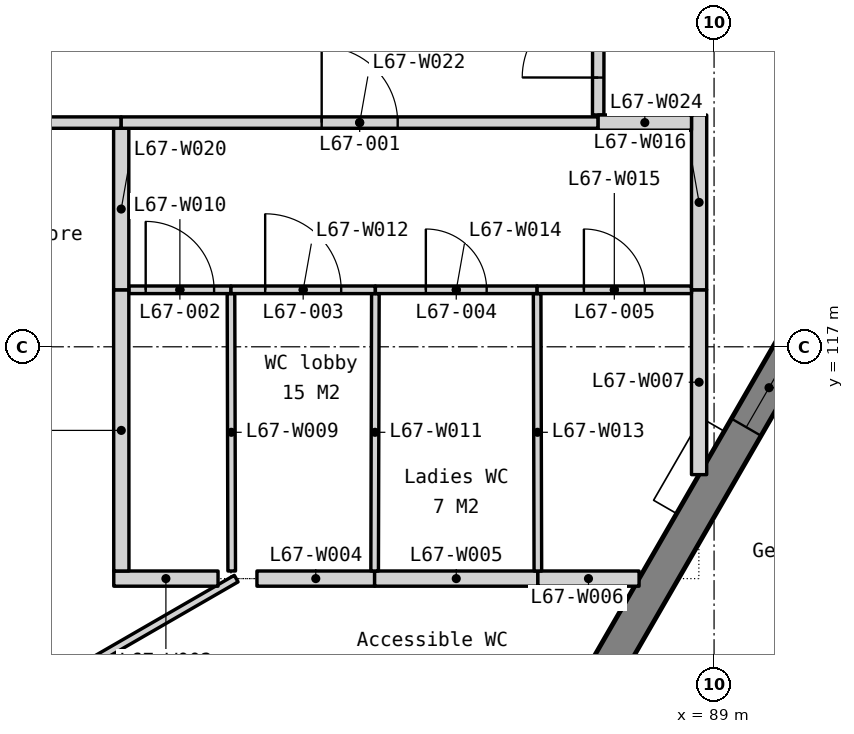
"""IFC4 building model, lengths in metres.
Left out: names, types, materials, properties, quantities, classifications, styles, units other than length and angle.
Written with IfcOpenShell. Run it as: python <this file> out.ifc"""

import sys

from ifc_helpers import new_model, si_unit, direction, frame, frame_2d, origin, place, context, subcontext, project, spatial, polyline, rectangle, outline, extrude, element, fill, save


model = new_model("IFC4")
c1 = context("Model", 3, precision=1e-05, world=origin(), true_north=direction((0.0, 1.0)))
c2 = subcontext(c1, "Body", "Model", "MODEL_VIEW")
j1 = project(units=[si_unit("LENGTHUNIT", "METRE"), si_unit("PLANEANGLEUNIT", "RADIAN")], contexts=[c1])
p1 = place(None, origin())
s1 = spatial("IfcSite", under=j1, at=p1, CompositionType="ELEMENT")
p2 = place(p1, origin())
s2 = spatial("IfcBuilding", under=s1, at=p2, CompositionType="ELEMENT")
p3 = place(p2, frame((0.0, 0.0, 273.8)))
s3 = spatial("IfcBuildingStorey", under=s2, at=p3, CompositionType="ELEMENT", Elevation=273.8)
p4 = place(p3, frame((86.427, 110.752, -0.15), z_axis=(0.0, 0.0, 1.0), x_axis=(0.500000383388, 0.866025182435, 0.0)))
e1 = element("IfcWall", 1, at=p4, inside=s3, PredefinedType="SOLIDWALL", context=c2, shape_type="SweptSolid", body=[
    extrude(outline(polyline([(25.929, 3.9), (25.929, 0.0), (0.0, 0.0), (0.0, 3.9), (25.929, 3.9)])), frame((0.0, 0.225, 0.0), z_axis=(0.0, -1.0, 0.0), x_axis=(1.0, 0.0, 0.0)), (0.0, 0.0, 1.0), 0.45),
])
p5 = place(p4, frame((5.993, 0.0, 0.95)))
e2 = element("IfcOpeningElement", 2, at=p5, cuts=e1, PredefinedType="OPENING", context=c2, shape_type="SweptSolid", body=[
    extrude(rectangle(XDim=1.2, YDim=2.2, at=frame_2d((0.6, 1.1))), frame((0.0, 0.235, 0.0), z_axis=(0.0, -1.0, 0.0), x_axis=(1.0, 0.0, 0.0)), (0.0, 0.0, 1.0), 0.47),
])
p6 = place(p4, frame((7.693, 0.0, 0.95)))
e3 = element("IfcOpeningElement", 3, at=p6, cuts=e1, PredefinedType="OPENING", context=c2, shape_type="SweptSolid", body=[
    extrude(rectangle(XDim=1.2, YDim=2.2, at=frame_2d((0.6, 1.1))), frame((0.0, 0.235, 0.0), z_axis=(0.0, -1.0, 0.0), x_axis=(1.0, 0.0, 0.0)), (0.0, 0.0, 1.0), 0.47),
])
p7 = place(p4, frame((15.236, 0.0, 0.95)))
e4 = element("IfcOpeningElement", 4, at=p7, cuts=e1, PredefinedType="OPENING", context=c2, shape_type="SweptSolid", body=[
    extrude(rectangle(XDim=1.2, YDim=2.2, at=frame_2d((0.6, 1.1))), frame((0.0, 0.235, 0.0), z_axis=(0.0, -1.0, 0.0), x_axis=(1.0, 0.0, 0.0)), (0.0, 0.0, 1.0), 0.47),
])
p8 = place(p4, frame((16.936, 0.0, 0.95)))
e5 = element("IfcOpeningElement", 5, at=p8, cuts=e1, PredefinedType="OPENING", context=c2, shape_type="SweptSolid", body=[
    extrude(rectangle(XDim=1.2, YDim=2.2, at=frame_2d((0.6, 1.1))), frame((0.0, 0.235, 0.0), z_axis=(0.0, -1.0, 0.0), x_axis=(1.0, 0.0, 0.0)), (0.0, 0.0, 1.0), 0.47),
])
p9 = place(p4, frame((24.015, 0.0, 0.95)))
e6 = element("IfcOpeningElement", 6, at=p9, cuts=e1, PredefinedType="OPENING", context=c2, shape_type="SweptSolid", body=[
    extrude(rectangle(XDim=1.2, YDim=2.2, at=frame_2d((0.6, 1.1))), frame((0.0, 0.235, 0.0), z_axis=(0.0, -1.0, 0.0), x_axis=(1.0, 0.0, 0.0)), (0.0, 0.0, 1.0), 0.47),
])
p10 = place(p3, frame((74.668, 109.305, 0.0), z_axis=(0.0, 0.0, 1.0), x_axis=(0.866021891294, 0.500006083763, 0.0)))
e7 = element("IfcWall", 7, at=p10, inside=s3, PredefinedType="PARTITIONING", context=c2, shape_type="SweptSolid", body=[
    extrude(rectangle(XDim=9.289, YDim=0.1, at=frame_2d((4.645, 0.0))), origin(), (0.0, 0.0, 1.0), 3.75),
])
p11 = place(p10, frame((4.195, 0.0, 0.0)))
e8 = element("IfcOpeningElement", 8, at=p11, cuts=e7, PredefinedType="OPENING", context=c2, shape_type="SweptSolid", body=[
    extrude(rectangle(XDim=0.9, YDim=2.1, at=frame_2d((0.45, 1.05))), frame((0.0, 0.06, 0.0), z_axis=(0.0, -1.0, 0.0), x_axis=(1.0, 0.0, 0.0)), (0.0, 0.0, 1.0), 0.12),
])
p12 = place(p3, frame((81.102, 113.95, 0.0), z_axis=(0.0, 0.0, 1.0), x_axis=(1.0, 0.0, 0.0)))
e9 = element("IfcWall", 9, at=p12, inside=s3, PredefinedType="PARTITIONING", context=c2, shape_type="SweptSolid", body=[
    extrude(rectangle(XDim=1.372, YDim=0.2, at=frame_2d((0.686, 0.0))), origin(), (0.0, 0.0, 1.0), 3.75),
])
p13 = place(p3, frame((82.986, 113.95, 0.0), z_axis=(0.0, 0.0, 1.0), x_axis=(1.0, 0.0, 0.0)))
e10 = element("IfcWall", 10, at=p13, inside=s3, PredefinedType="PARTITIONING", context=c2, shape_type="SweptSolid", body=[
    extrude(rectangle(XDim=1.548, YDim=0.2, at=frame_2d((0.774, 0.0))), origin(), (0.0, 0.0, 1.0), 3.75),
])
p14 = place(p3, frame((84.534, 113.95, 0.0), z_axis=(0.0, 0.0, 1.0), x_axis=(1.0, 0.0, 0.0)))
e11 = element("IfcWall", 11, at=p14, inside=s3, PredefinedType="PARTITIONING", context=c2, shape_type="SweptSolid", body=[
    extrude(rectangle(XDim=2.148, YDim=0.2, at=frame_2d((1.074, 0.0))), origin(), (0.0, 0.0, 1.0), 3.75),
])
p15 = place(p3, frame((86.682, 113.95, 0.0), z_axis=(0.0, 0.0, 1.0), x_axis=(1.0, 0.0, 0.0)))
e12 = element("IfcWall", 12, at=p15, inside=s3, PredefinedType="PARTITIONING", context=c2, shape_type="SweptSolid", body=[
    extrude(rectangle(XDim=1.332, YDim=0.2, at=frame_2d((0.666, 0.0))), origin(), (0.0, 0.0, 1.0), 3.75),
])
p16 = place(p3, frame((88.803, 115.318, 0.0), z_axis=(0.0, 0.0, 1.0), x_axis=(0.0, 1.0, 0.0)))
e13 = element("IfcWall", 13, at=p16, inside=s3, PredefinedType="PARTITIONING", context=c2, shape_type="SweptSolid", body=[
    extrude(rectangle(XDim=2.432, YDim=0.2, at=frame_2d((1.216, 0.0))), origin(), (0.0, 0.0, 1.0), 3.062),
])
p17 = place(p3, frame((82.654, 114.05, 0.0), z_axis=(0.0, 0.0, 1.0), x_axis=(-0.002675575707, 0.999996420641, 0.0)))
e14 = element("IfcWall", 14, at=p17, inside=s3, PredefinedType="PARTITIONING", context=c2, shape_type="SweptSolid", body=[
    extrude(rectangle(XDim=3.65, YDim=0.1, at=frame_2d((1.825, 0.0))), origin(), (0.0, 0.0, 1.0), 3.75),
])
p18 = place(p3, frame((81.3, 117.75, 0.0), z_axis=(0.0, 0.0, 1.0), x_axis=(1.0, 0.0, 0.0)))
e15 = element("IfcWall", 15, at=p18, inside=s3, PredefinedType="PARTITIONING", context=c2, shape_type="SweptSolid", body=[
    extrude(rectangle(XDim=1.344, YDim=0.1, at=frame_2d((0.672, 0.0))), origin(), (0.0, 0.0, 1.0), 3.75),
])
p19 = place(p18, frame((0.222, 0.0, 0.0)))
e16 = element("IfcOpeningElement", 16, at=p19, cuts=e15, PredefinedType="OPENING", context=c2, shape_type="SweptSolid", body=[
    extrude(rectangle(XDim=0.9, YDim=2.1, at=frame_2d((0.45, 1.05))), frame((0.0, 0.06, 0.0), z_axis=(0.0, -1.0, 0.0), x_axis=(1.0, 0.0, 0.0)), (0.0, 0.0, 1.0), 0.12),
])
p20 = place(p3, frame((84.534, 114.05, 0.0), z_axis=(0.0, 0.0, 1.0), x_axis=(0.002675575707, 0.999996420641, 0.0)))
e17 = element("IfcWall", 17, at=p20, inside=s3, PredefinedType="PARTITIONING", context=c2, shape_type="SweptSolid", body=[
    extrude(rectangle(XDim=3.65, YDim=0.1, at=frame_2d((1.825, 0.0))), origin(), (0.0, 0.0, 1.0), 3.75),
])
p21 = place(p3, frame((82.644, 117.75, 0.0), z_axis=(0.0, 0.0, 1.0), x_axis=(1.0, 0.0, 0.0)))
e18 = element("IfcWall", 18, at=p21, inside=s3, PredefinedType="PARTITIONING", context=c2, shape_type="SweptSolid", body=[
    extrude(rectangle(XDim=1.9, YDim=0.1, at=frame_2d((0.95, 0.0))), origin(), (0.0, 0.0, 1.0), 3.75),
])
p22 = place(p21, frame((0.45, 0.0, 0.0)))
e19 = element("IfcOpeningElement", 19, at=p22, cuts=e18, PredefinedType="OPENING", context=c2, shape_type="SweptSolid", body=[
    extrude(rectangle(XDim=1.0, YDim=2.1, at=frame_2d((0.5, 1.05))), frame((0.0, 0.06, 0.0), z_axis=(0.0, -1.0, 0.0), x_axis=(1.0, 0.0, 0.0)), (0.0, 0.0, 1.0), 0.12),
])
p23 = place(p3, frame((86.682, 114.05, 0.0), z_axis=(0.0, 0.0, 1.0), x_axis=(-0.002608686776, 0.999996597371, 0.0)))
e20 = element("IfcWall", 20, at=p23, inside=s3, PredefinedType="PARTITIONING", context=c2, shape_type="SweptSolid", body=[
    extrude(rectangle(XDim=3.65, YDim=0.1, at=frame_2d((1.825, 0.0))), origin(), (0.0, 0.0, 1.0), 3.75),
])
p24 = place(p3, frame((84.544, 117.75, 0.0), z_axis=(0.0, 0.0, 1.0), x_axis=(1.0, 0.0, 0.0)))
e21 = element("IfcWall", 21, at=p24, inside=s3, PredefinedType="PARTITIONING", context=c2, shape_type="SweptSolid", body=[
    extrude(rectangle(XDim=2.128, YDim=0.1, at=frame_2d((1.064, 0.0))), origin(), (0.0, 0.0, 1.0), 3.75),
])
p25 = place(p24, frame((0.664, 0.0, 0.0)))
e22 = element("IfcOpeningElement", 22, at=p25, cuts=e21, PredefinedType="OPENING", context=c2, shape_type="SweptSolid", body=[
    extrude(rectangle(XDim=0.8, YDim=2.1, at=frame_2d((0.4, 1.05))), frame((0.0, 0.06, 0.0), z_axis=(0.0, -1.0, 0.0), x_axis=(1.0, 0.0, 0.0)), (0.0, 0.0, 1.0), 0.12),
])
p26 = place(p3, frame((86.672, 117.75, 0.0), z_axis=(0.0, 0.0, 1.0), x_axis=(1.0, 0.0, 0.0)))
e23 = element("IfcWall", 23, at=p26, inside=s3, PredefinedType="PARTITIONING", context=c2, shape_type="SweptSolid", body=[
    extrude(rectangle(XDim=2.031, YDim=0.1, at=frame_2d((1.015, 0.0))), origin(), (0.0, 0.0, 1.0), 3.75),
])
p27 = place(p26, frame((0.615, 0.0, 0.0)))
e24 = element("IfcOpeningElement", 24, at=p27, cuts=e23, PredefinedType="OPENING", context=c2, shape_type="SweptSolid", body=[
    extrude(rectangle(XDim=0.8, YDim=2.1, at=frame_2d((0.4, 1.05))), frame((0.0, 0.06, 0.0), z_axis=(0.0, -1.0, 0.0), x_axis=(1.0, 0.0, 0.0)), (0.0, 0.0, 1.0), 0.12),
])
p28 = place(p3, frame((88.803, 120.05, 0.0), z_axis=(0.0, 0.0, 1.0), x_axis=(0.0, -1.0, 0.0)))
e25 = element("IfcWall", 25, at=p28, inside=s3, PredefinedType="PARTITIONING", context=c2, shape_type="SweptSolid", body=[
    extrude(rectangle(XDim=2.3, YDim=0.2, at=frame_2d((1.15, 0.0))), origin(), (0.0, 0.0, 1.0), 3.062),
])
p29 = place(p3, frame((81.2, 117.75, 0.0), z_axis=(0.0, 0.0, 1.0), x_axis=(0.000527878514, -0.999999860672, 0.0)))
e26 = element("IfcWall", 26, at=p29, inside=s3, PredefinedType="PARTITIONING", context=c2, shape_type="SweptSolid", body=[
    extrude(rectangle(XDim=3.7, YDim=0.2, at=frame_2d((1.85, 0.0))), origin(), (0.0, 0.0, 1.0), 3.75),
])
p30 = place(p3, frame((81.2, 117.75, 0.0), z_axis=(0.0, 0.0, 1.0), x_axis=(0.0, 1.0, 0.0)))
e27 = element("IfcWall", 27, at=p30, inside=s3, PredefinedType="PARTITIONING", context=c2, shape_type="SweptSolid", body=[
    extrude(rectangle(XDim=2.125, YDim=0.2, at=frame_2d((1.062, 0.0))), origin(), (0.0, 0.0, 1.0), 3.75),
])
p31 = place(p3, frame((74.619, 119.95, 0.0), z_axis=(0.0, 0.0, 1.0), x_axis=(1.0, 0.0, 0.0)))
e28 = element("IfcWall", 28, at=p31, inside=s3, PredefinedType="PARTITIONING", context=c2, shape_type="SweptSolid", body=[
    extrude(rectangle(XDim=6.581, YDim=0.15, at=frame_2d((3.291, 0.0))), origin(), (0.0, 0.0, 1.0), 3.75),
])
p32 = place(p31, frame((2.791, 0.0, 0.0)))
e29 = element("IfcOpeningElement", 29, at=p32, cuts=e28, PredefinedType="OPENING", context=c2, shape_type="SweptSolid", body=[
    extrude(rectangle(XDim=1.0, YDim=2.1, at=frame_2d((0.5, 1.05))), frame((0.0, 0.085, 0.0), z_axis=(0.0, -1.0, 0.0), x_axis=(1.0, 0.0, 0.0)), (0.0, 0.0, 1.0), 0.17),
])
p33 = place(p3, frame((81.2, 119.95, 0.0), z_axis=(0.0, 0.0, 1.0), x_axis=(1.0, 0.0, 0.0)))
e30 = element("IfcWall", 30, at=p33, inside=s3, PredefinedType="PARTITIONING", context=c2, shape_type="SweptSolid", body=[
    extrude(rectangle(XDim=6.275, YDim=0.15, at=frame_2d((3.137, 0.0))), origin(), (0.0, 0.0, 1.0), 3.75),
])
p34 = place(p33, frame((2.637, 0.0, 0.0)))
e31 = element("IfcOpeningElement", 31, at=p34, cuts=e30, PredefinedType="OPENING", context=c2, shape_type="SweptSolid", body=[
    extrude(rectangle(XDim=1.0, YDim=2.1, at=frame_2d((0.5, 1.05))), frame((0.0, 0.085, 0.0), z_axis=(0.0, -1.0, 0.0), x_axis=(1.0, 0.0, 0.0)), (0.0, 0.0, 1.0), 0.17),
])
p35 = place(p3, frame((87.475, 120.05, 0.0), z_axis=(0.0, 0.0, 1.0), x_axis=(0.001476558006, 0.999998909888, 0.0)))
e32 = element("IfcWall", 32, at=p35, inside=s3, PredefinedType="PARTITIONING", context=c2, shape_type="SweptSolid", body=[
    extrude(rectangle(XDim=1.984, YDim=0.15, at=frame_2d((0.992, 0.0))), origin(), (0.0, 0.0, 1.0), 3.75),
])
p36 = place(p35, frame((0.492, 0.0, 0.0)))
e33 = element("IfcOpeningElement", 33, at=p36, cuts=e32, PredefinedType="OPENING", context=c2, shape_type="SweptSolid", body=[
    extrude(rectangle(XDim=1.0, YDim=2.1, at=frame_2d((0.5, 1.05))), frame((0.0, 0.085, 0.0), z_axis=(0.0, -1.0, 0.0), x_axis=(1.0, 0.0, 0.0)), (0.0, 0.0, 1.0), 0.17),
])
p37 = place(p3, frame((87.475, 119.95, 0.0), z_axis=(0.0, 0.0, 1.0), x_axis=(1.0, 0.0, 0.0)))
e34 = element("IfcWall", 34, at=p37, inside=s3, PredefinedType="PARTITIONING", context=c2, shape_type="SweptSolid", body=[
    extrude(rectangle(XDim=1.228, YDim=0.2, at=frame_2d((0.614, 0.0))), origin(), (0.0, 0.0, 1.0), 3.75),
])
p38 = place(p5, origin())
e35 = element("IfcWindow", 35, at=p38, inside=s3, PartitioningType="SINGLE_PANEL", PredefinedType="WINDOW", context=c2, shape_type="SweptSolid", body=[
    extrude(rectangle(XDim=1.2, YDim=2.2, at=frame_2d((0.6, 1.1))), frame((0.0, 0.03, 0.0), z_axis=(0.0, -1.0, 0.0), x_axis=(1.0, 0.0, 0.0)), (0.0, 0.0, 1.0), 0.06),
])
fill(e2, e35)
p39 = place(p34, origin())
e36 = element("IfcDoor", 36, at=p39, inside=s3, OperationType="SINGLE_SWING_LEFT", PredefinedType="DOOR", context=c2, shape_type="SweptSolid", body=[
    extrude(rectangle(XDim=1.0, YDim=2.1, at=frame_2d((0.5, 1.05))), frame((0.0, 0.025, 0.0), z_axis=(0.0, -1.0, 0.0), x_axis=(1.0, 0.0, 0.0)), (0.0, 0.0, 1.0), 0.05),
])
fill(e31, e36)
p40 = place(p19, origin())
e37 = element("IfcDoor", 37, at=p40, inside=s3, OperationType="SINGLE_SWING_LEFT", PredefinedType="DOOR", context=c2, shape_type="SweptSolid", body=[
    extrude(rectangle(XDim=0.9, YDim=2.1, at=frame_2d((0.45, 1.05))), frame((0.0, 0.025, 0.0), z_axis=(0.0, -1.0, 0.0), x_axis=(1.0, 0.0, 0.0)), (0.0, 0.0, 1.0), 0.05),
])
fill(e16, e37)
p41 = place(p22, origin())
e38 = element("IfcDoor", 38, at=p41, inside=s3, OperationType="SINGLE_SWING_LEFT", PredefinedType="DOOR", context=c2, shape_type="SweptSolid", body=[
    extrude(rectangle(XDim=1.0, YDim=2.1, at=frame_2d((0.5, 1.05))), frame((0.0, 0.025, 0.0), z_axis=(0.0, -1.0, 0.0), x_axis=(1.0, 0.0, 0.0)), (0.0, 0.0, 1.0), 0.05),
])
fill(e19, e38)
p42 = place(p25, origin())
e39 = element("IfcDoor", 39, at=p42, inside=s3, OperationType="SINGLE_SWING_LEFT", PredefinedType="DOOR", context=c2, shape_type="SweptSolid", body=[
    extrude(rectangle(XDim=0.8, YDim=2.1, at=frame_2d((0.4, 1.05))), frame((0.0, 0.025, 0.0), z_axis=(0.0, -1.0, 0.0), x_axis=(1.0, 0.0, 0.0)), (0.0, 0.0, 1.0), 0.05),
])
fill(e22, e39)
p43 = place(p27, origin())
e40 = element("IfcDoor", 40, at=p43, inside=s3, OperationType="SINGLE_SWING_LEFT", PredefinedType="DOOR", context=c2, shape_type="SweptSolid", body=[
    extrude(rectangle(XDim=0.8, YDim=2.1, at=frame_2d((0.4, 1.05))), frame((0.0, 0.025, 0.0), z_axis=(0.0, -1.0, 0.0), x_axis=(1.0, 0.0, 0.0)), (0.0, 0.0, 1.0), 0.05),
])
fill(e24, e40)
p44 = place(p36, origin())
e41 = element("IfcDoor", 41, at=p44, inside=s3, OperationType="SINGLE_SWING_LEFT", PredefinedType="DOOR", context=c2, shape_type="SweptSolid", body=[
    extrude(rectangle(XDim=1.0, YDim=2.1, at=frame_2d((0.5, 1.05))), frame((0.0, 0.025, 0.0), z_axis=(0.0, -1.0, 0.0), x_axis=(1.0, 0.0, 0.0)), (0.0, 0.0, 1.0), 0.05),
])
fill(e33, e41)
save(model, sys.argv[1])
